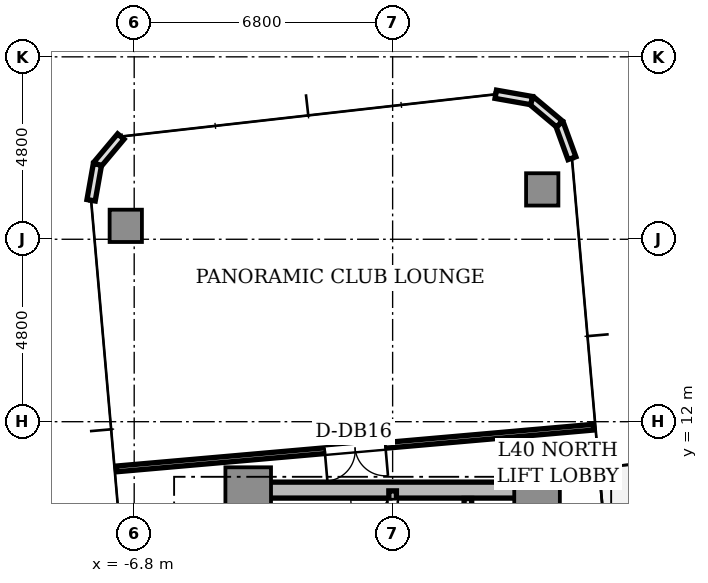
"""IFC4 building model, lengths in metres.
Left out: names, types, materials, properties, quantities, classifications, styles, units other than length and angle.
Written with IfcOpenShell. Run it as: python <this file> out.ifc"""

import sys

from ifc_helpers import new_model, si_unit, direction, frame, frame_2d, origin, origin_2d, place, context, subcontext, project, spatial, rectangle, extrude, source, transform, mapped, element, fill, save


model = new_model("IFC4")
c1 = context("Model", 3, precision=1e-05, world=origin(), true_north=direction((0.0, 1.0)))
c2 = subcontext(c1, "Body", "Model", "MODEL_VIEW")
j1 = project(units=[si_unit("LENGTHUNIT", "METRE"), si_unit("PLANEANGLEUNIT", "RADIAN")], contexts=[c1])
p1 = place(None, origin())
s1 = spatial("IfcSite", under=j1, at=p1, CompositionType="ELEMENT")
p2 = place(p1, origin())
s2 = spatial("IfcBuilding", under=s1, at=p2, CompositionType="ELEMENT")
p3 = place(p2, frame((0.0, 0.0, 147.25)))
s3 = spatial("IfcBuildingStorey", under=s2, at=p3, CompositionType="ELEMENT", Elevation=147.25)
p4 = place(p3, frame((-3.55, 10.2, 0.0), z_axis=(0.0, 0.0, 1.0), x_axis=(1.0, 0.0, 0.0)))
e1 = element("IfcWall", 1, at=p4, inside=s3, PredefinedType="SHEAR", context=c2, shape_type="SweptSolid", body=[
    extrude(rectangle(XDim=7.1, YDim=0.42, at=frame_2d((3.55, 0.0))), origin(), (0.0, 0.0, 1.0), 3.11),
])
m1 = source(origin(), c2, "Body", "SweptSolid", [
    extrude(rectangle(XDim=1.2, YDim=1.2, at=origin_2d()), origin(), (0.0, 0.0, 1.0), 3.11),
])
for number, where, z_axis, x_axis in (
    (2, (-3.8, 10.2, 0.0), (0.0, 0.0, 1.0), (1.0, 0.0, 0.0)),
    (3, (3.8, 10.2, 0.0), (0.0, 0.0, 1.0), (1.0, 0.0, 0.0)),
):
    element("IfcColumn", number, at=place(p3, frame(where, z_axis=z_axis, x_axis=x_axis)), inside=s3, PredefinedType="COLUMN", context=c2, shape_type="MappedRepresentation", body=[
        mapped(m1, transform((0.0, 0.0, 0.0), scale=1.0)),
    ])
m2 = source(origin(), c2, "Body", "SweptSolid", [
    extrude(rectangle(XDim=0.85, YDim=0.85, at=origin_2d()), origin(), (0.0, 0.0, 1.0), 3.11),
])
for number, where, z_axis, x_axis in (
    (4, (3.936, 18.112, 0.0), (0.0, 0.0, 1.0), (1.0, 0.0, 0.0)),
    (5, (-7.022, 17.153, 0.0), (0.0, 0.0, 1.0), (1.0, 0.0, 0.0)),
):
    element("IfcColumn", number, at=place(p3, frame(where, z_axis=z_axis, x_axis=x_axis)), inside=s3, PredefinedType="COLUMN", context=c2, shape_type="MappedRepresentation", body=[
        mapped(m2, transform((0.0, 0.0, 0.0), scale=1.0)),
    ])
p5 = place(p3, frame((4.718, 18.933, 0.0), z_axis=(0.0, 0.0, 1.0), x_axis=(-0.34188635151, 0.939741306239, 0.0)))
e6 = element("IfcWall", 6, at=p5, inside=s3, PredefinedType="STANDARD", context=c2, shape_type="SweptSolid", body=[
    extrude(rectangle(XDim=0.958, YDim=0.22, at=frame_2d((0.479, 0.0))), origin(), (0.0, 0.0, 1.0), 3.11),
])
for number, where, z_axis, x_axis in (
    (7, (4.39, 19.833, 0.0), (0.0, 0.0, 1.0), (-0.766, 0.643, 0.0)),
    (8, (3.657, 20.449, 0.0), (0.0, 0.0, 1.0), (-0.985, 0.174, 0.0)),
):
    element("IfcWall", number, at=place(p3, frame(where, z_axis=z_axis, x_axis=x_axis)), inside=s3, PredefinedType="STANDARD", context=c2, shape_type="SweptSolid", body=[
        extrude(rectangle(XDim=0.958, YDim=0.22, at=frame_2d((0.479, 0.0))), origin(), (0.0, 0.0, 1.0), 3.11),
    ])
for number, where, z_axis, x_axis in (
    (9, (-7.152, 19.503, 0.0), (0.0, 0.0, 1.0), (-0.643, -0.766, 0.0)),
    (10, (-7.768, 18.769, 0.0), (0.0, 0.0, 1.0), (-0.174, -0.985, 0.0)),
):
    element("IfcWall", number, at=place(p3, frame(where, z_axis=z_axis, x_axis=x_axis)), inside=s3, PredefinedType="STANDARD", context=c2, shape_type="SweptSolid", body=[
        extrude(rectangle(XDim=0.958, YDim=0.22, at=frame_2d((0.479, 0.0))), origin(), (0.0, 0.0, 1.0), 3.11),
    ])
p6 = place(p3, frame((0.0, 2.5, 0.0), z_axis=(0.0, 0.0, 1.0), x_axis=(0.0, 1.0, 0.0)))
e11 = element("IfcWall", 11, at=p6, inside=s3, PredefinedType="SOLIDWALL", context=c2, shape_type="SweptSolid", body=[
    extrude(rectangle(XDim=7.68, YDim=0.2, at=frame_2d((3.84, 0.0))), origin(), (0.0, 0.0, 1.0), 3.11),
])
p7 = place(p6, frame((6.36, 0.0, 0.0)))
e12 = element("IfcOpeningElement", 12, at=p7, cuts=e11, PredefinedType="OPENING", context=c2, shape_type="SweptSolid", body=[
    extrude(rectangle(XDim=1.1, YDim=2.15, at=frame_2d((0.55, 1.075))), frame((0.0, 0.11, 0.0), z_axis=(0.0, -1.0, 0.0), x_axis=(1.0, 0.0, 0.0)), (0.0, 0.0, 1.0), 0.22),
])
p8 = place(p3, frame((1.98, 5.32, 0.0), z_axis=(0.0, 0.0, 1.0), x_axis=(0.0, 1.0, 0.0)))
e13 = element("IfcWall", 13, at=p8, inside=s3, PredefinedType="SOLIDWALL", context=c2, shape_type="SweptSolid", body=[
    extrude(rectangle(XDim=4.66, YDim=0.2, at=frame_2d((2.33, 0.0))), origin(), (0.0, 0.0, 1.0), 2.66),
])
p9 = place(p8, frame((3.04, 0.0, 0.0)))
e14 = element("IfcOpeningElement", 14, at=p9, cuts=e13, PredefinedType="OPENING", context=c2, shape_type="SweptSolid", body=[
    extrude(rectangle(XDim=0.85, YDim=2.1, at=frame_2d((0.425, 1.05))), frame((0.0, 0.11, 0.0), z_axis=(0.0, -1.0, 0.0), x_axis=(1.0, 0.0, 0.0)), (0.0, 0.0, 1.0), 0.22),
])
p10 = place(p3, frame((5.287, 11.856, 0.0), z_axis=(0.0, 0.0, 1.0), x_axis=(-0.996194790044, -0.087154691724, 0.0)))
e15 = element("IfcWall", 15, at=p10, inside=s3, PredefinedType="PARTITIONING", context=c2, shape_type="SweptSolid", body=[
    extrude(rectangle(XDim=12.6, YDim=0.15, at=frame_2d((6.3, 0.0))), origin(), (0.0, 0.0, 1.0), 2.66),
])
p11 = place(p10, frame((5.5, 0.0, 0.0)))
e16 = element("IfcOpeningElement", 16, at=p11, cuts=e15, PredefinedType="OPENING", context=c2, shape_type="SweptSolid", body=[
    extrude(rectangle(XDim=1.6, YDim=2.25, at=frame_2d((0.8, 1.125))), frame((0.0, 0.085, 0.0), z_axis=(0.0, -1.0, 0.0), x_axis=(1.0, 0.0, 0.0)), (0.0, 0.0, 1.0), 0.17),
])
m3 = source(origin(), c2, "Body", "SweptSolid", [
    extrude(rectangle(XDim=1.1, YDim=0.05, at=origin_2d()), origin(), (0.0, 0.0, 1.0), 2.15),
])
p12 = place(p7, frame((0.55, 0.0, 0.0)))
e17 = element("IfcDoor", 17, at=p12, inside=s3, OperationType="SINGLE_SWING_RIGHT", PredefinedType="DOOR", context=c2, shape_type="MappedRepresentation", body=[
    mapped(m3, transform((0.0, 0.0, 0.0), scale=1.0)),
])
fill(e12, e17)
m4 = source(origin(), c2, "Body", "SweptSolid", [
    extrude(rectangle(XDim=1.6, YDim=0.05, at=origin_2d()), origin(), (0.0, 0.0, 1.0), 2.25),
])
p13 = place(p11, frame((0.8, 0.0, 0.0)))
e18 = element("IfcDoor", 18, at=p13, inside=s3, OperationType="DOUBLE_DOOR_SINGLE_SWING", PredefinedType="DOOR", context=c2, shape_type="MappedRepresentation", body=[
    mapped(m4, transform((0.0, 0.0, 0.0), scale=1.0)),
])
fill(e16, e18)
save(model, sys.argv[1])
